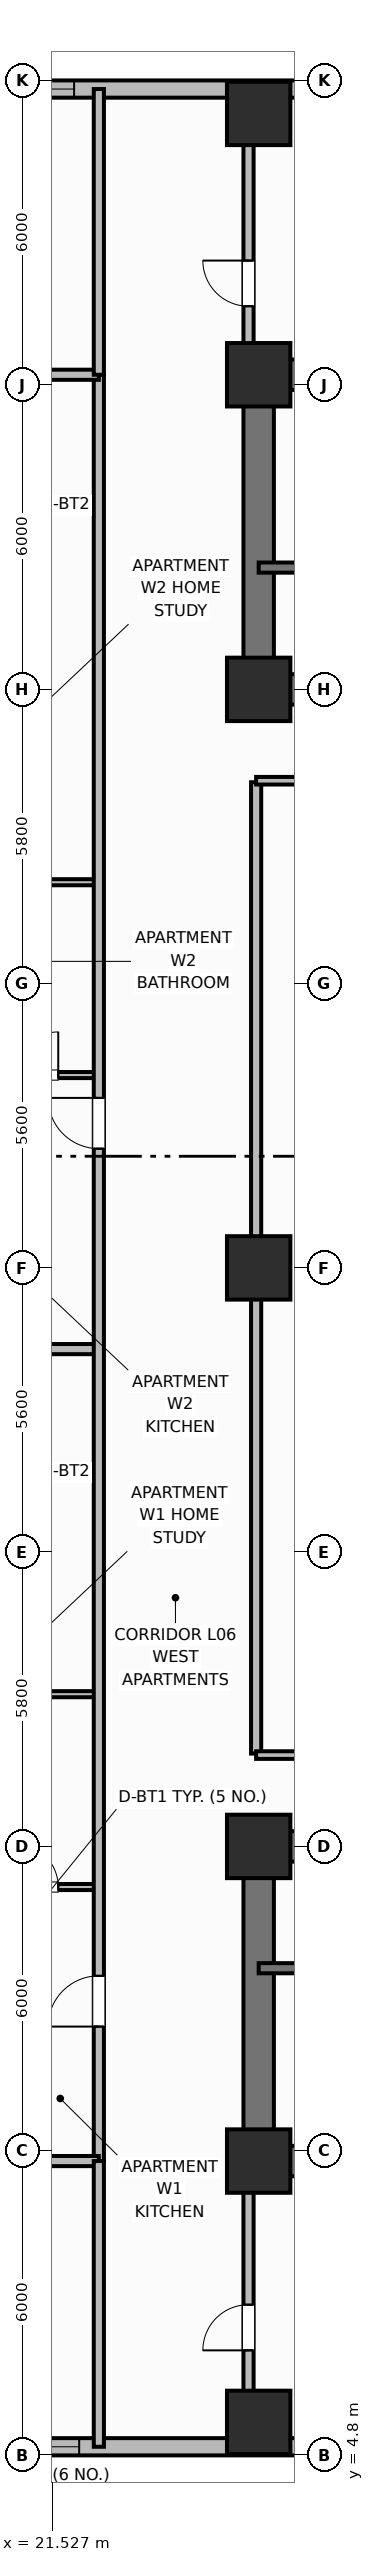
"""IFC4 building model, lengths in metres.
Left out: names, types, materials, properties, quantities, classifications, styles, units other than length and angle.
Written with IfcOpenShell. Run it as: python <this file> out.ifc"""

import sys

from ifc_helpers import new_model, si_unit, direction, frame, frame_2d, origin, origin_2d, place, context, subcontext, project, spatial, rectangle, extrude, element, fill, save


model = new_model("IFC4")
c1 = context("Model", 3, precision=1e-05, world=origin(), true_north=direction((0.0, 1.0)))
c2 = subcontext(c1, "Body", "Model", "MODEL_VIEW")
j1 = project(units=[si_unit("LENGTHUNIT", "METRE"), si_unit("PLANEANGLEUNIT", "RADIAN")], contexts=[c1])
p1 = place(None, origin())
s1 = spatial("IfcSite", under=j1, at=p1, CompositionType="ELEMENT")
p2 = place(p1, origin())
s2 = spatial("IfcBuilding", under=s1, at=p2, CompositionType="ELEMENT")
p3 = place(p2, frame((0.0, 0.0, 28.8)))
s3 = spatial("IfcBuildingStorey", under=s2, at=p3, CompositionType="ELEMENT", Elevation=28.8)
p4 = place(p3, frame((52.8, 10.6, 0.0), z_axis=(0.0, 0.0, 1.0), x_axis=(-1.0, 0.0, 0.0)))
e1 = element("IfcWall", 1, at=p4, inside=s3, PredefinedType="SHEAR", context=c2, shape_type="SweptSolid", body=[
    extrude(rectangle(XDim=27.2, YDim=0.6, at=frame_2d((13.6, 0.0))), origin(), (0.0, 0.0, 1.0), 3.7),
])
p5 = place(p3, frame((25.6, 10.9, 0.0), z_axis=(0.0, 0.0, 1.0), x_axis=(0.0, 1.0, 0.0)))
e2 = element("IfcWall", 2, at=p5, inside=s3, PredefinedType="SHEAR", context=c2, shape_type="SweptSolid", body=[
    extrude(rectangle(XDim=5.6, YDim=0.6, at=frame_2d((2.8, 0.0))), origin(), (0.0, 0.0, 1.0), 3.7),
])
p6 = place(p3, frame((25.6, 16.8, 0.0), z_axis=(0.0, 0.0, 1.0), x_axis=(1.0, 0.0, 0.0)))
e3 = element("IfcWall", 3, at=p6, inside=s3, PredefinedType="SHEAR", context=c2, shape_type="SweptSolid", body=[
    extrude(rectangle(XDim=27.2, YDim=0.6, at=frame_2d((13.6, 0.0))), origin(), (0.0, 0.0, 1.0), 3.7),
])
p7 = place(p6, frame((1.9, 0.0, 0.0)))
e4 = element("IfcOpeningElement", 4, at=p7, cuts=e3, PredefinedType="OPENING", context=c2, shape_type="SweptSolid", body=[
    extrude(rectangle(XDim=1.1, YDim=2.15, at=frame_2d((0.55, 1.075))), frame((0.0, 0.31, 0.0), z_axis=(0.0, -1.0, 0.0), x_axis=(1.0, 0.0, 0.0)), (0.0, 0.0, 1.0), 0.62),
])
p8 = place(p6, frame((13.0, 0.0, 0.0)))
e5 = element("IfcOpeningElement", 5, at=p8, cuts=e3, PredefinedType="OPENING", context=c2, shape_type="SweptSolid", body=[
    extrude(rectangle(XDim=1.2, YDim=2.15, at=frame_2d((0.6, 1.075))), frame((0.0, 0.31, 0.0), z_axis=(0.0, -1.0, 0.0), x_axis=(1.0, 0.0, 0.0)), (0.0, 0.0, 1.0), 0.62),
])
p9 = place(p6, frame((20.4, 0.0, 0.0)))
e6 = element("IfcOpeningElement", 6, at=p9, cuts=e3, PredefinedType="OPENING", context=c2, shape_type="SweptSolid", body=[
    extrude(rectangle(XDim=1.3, YDim=2.2, at=frame_2d((0.65, 1.1))), frame((0.0, 0.31, 0.0), z_axis=(0.0, -1.0, 0.0), x_axis=(1.0, 0.0, 0.0)), (0.0, 0.0, 1.0), 0.62),
])
p10 = place(p6, frame((24.65, 0.0, 0.0)))
e7 = element("IfcOpeningElement", 7, at=p10, cuts=e3, PredefinedType="OPENING", context=c2, shape_type="SweptSolid", body=[
    extrude(rectangle(XDim=0.85, YDim=2.1, at=frame_2d((0.425, 1.05))), frame((0.0, 0.31, 0.0), z_axis=(0.0, -1.0, 0.0), x_axis=(1.0, 0.0, 0.0)), (0.0, 0.0, 1.0), 0.62),
])
p11 = place(p3, frame((25.6, 45.8, 0.0), z_axis=(0.0, 0.0, 1.0), x_axis=(1.0, 0.0, 0.0)))
e8 = element("IfcWall", 8, at=p11, inside=s3, PredefinedType="SHEAR", context=c2, shape_type="SweptSolid", body=[
    extrude(rectangle(XDim=27.2, YDim=0.6, at=frame_2d((13.6, 0.0))), origin(), (0.0, 0.0, 1.0), 3.7),
])
p12 = place(p3, frame((25.6, 39.9, 0.0), z_axis=(0.0, 0.0, 1.0), x_axis=(0.0, 1.0, 0.0)))
e9 = element("IfcWall", 9, at=p12, inside=s3, PredefinedType="SHEAR", context=c2, shape_type="SweptSolid", body=[
    extrude(rectangle(XDim=5.6, YDim=0.6, at=frame_2d((2.8, 0.0))), origin(), (0.0, 0.0, 1.0), 3.7),
])
p13 = place(p3, frame((52.8, 39.6, 0.0), z_axis=(0.0, 0.0, 1.0), x_axis=(-1.0, 0.0, 0.0)))
e10 = element("IfcWall", 10, at=p13, inside=s3, PredefinedType="SHEAR", context=c2, shape_type="SweptSolid", body=[
    extrude(rectangle(XDim=27.2, YDim=0.6, at=frame_2d((13.6, 0.0))), origin(), (0.0, 0.0, 1.0), 3.7),
])
p14 = place(p13, frame((24.2, 0.0, 0.0)))
e11 = element("IfcOpeningElement", 11, at=p14, cuts=e10, PredefinedType="OPENING", context=c2, shape_type="SweptSolid", body=[
    extrude(rectangle(XDim=1.1, YDim=2.15, at=frame_2d((0.55, 1.075))), frame((0.0, 0.31, 0.0), z_axis=(0.0, -1.0, 0.0), x_axis=(1.0, 0.0, 0.0)), (0.0, 0.0, 1.0), 0.62),
])
p15 = place(p13, frame((15.1, 0.0, 0.0)))
e12 = element("IfcOpeningElement", 12, at=p15, cuts=e10, PredefinedType="OPENING", context=c2, shape_type="SweptSolid", body=[
    extrude(rectangle(XDim=1.2, YDim=2.15, at=frame_2d((0.6, 1.075))), frame((0.0, 0.31, 0.0), z_axis=(0.0, -1.0, 0.0), x_axis=(1.0, 0.0, 0.0)), (0.0, 0.0, 1.0), 0.62),
])
p16 = place(p13, frame((11.6, 0.0, 0.0)))
e13 = element("IfcOpeningElement", 13, at=p16, cuts=e10, PredefinedType="OPENING", context=c2, shape_type="SweptSolid", body=[
    extrude(rectangle(XDim=0.9, YDim=2.1, at=frame_2d((0.45, 1.05))), frame((0.0, 0.31, 0.0), z_axis=(0.0, -1.0, 0.0), x_axis=(1.0, 0.0, 0.0)), (0.0, 0.0, 1.0), 0.62),
])
p17 = place(p13, frame((3.6, 0.0, 0.0)))
e14 = element("IfcOpeningElement", 14, at=p17, cuts=e10, PredefinedType="OPENING", context=c2, shape_type="SweptSolid", body=[
    extrude(rectangle(XDim=1.0, YDim=2.15, at=frame_2d((0.5, 1.075))), frame((0.0, 0.31, 0.0), z_axis=(0.0, -1.0, 0.0), x_axis=(1.0, 0.0, 0.0)), (0.0, 0.0, 1.0), 0.62),
])
for number, where, z_axis, x_axis in (
    (15, (25.6, 10.6, 0.0), (0.0, 0.0, 1.0), (1.0, 0.0, 0.0)),
    (16, (25.6, 16.8, 0.0), (0.0, 0.0, 1.0), (1.0, 0.0, 0.0)),
    (17, (25.6, 39.6, 0.0), (0.0, 0.0, 1.0), (1.0, 0.0, 0.0)),
    (18, (25.6, 45.8, 0.0), (0.0, 0.0, 1.0), (1.0, 0.0, 0.0)),
    (19, (25.6, 28.2, 0.0), (0.0, 0.0, 1.0), (1.0, 0.0, 0.0)),
    (20, (25.6, 5.45, 0.0), (0.0, 0.0, 1.0), (1.0, 0.0, 0.0)),
    (21, (25.6, 50.95, 0.0), (0.0, 0.0, 1.0), (1.0, 0.0, 0.0)),
):
    element("IfcColumn", number, at=place(p3, frame(where, z_axis=z_axis, x_axis=x_axis)), inside=s3, PredefinedType="COLUMN", context=c2, shape_type="SweptSolid", body=[
        extrude(rectangle(XDim=1.25, YDim=1.25, at=origin_2d()), origin(), (0.0, 0.0, 1.0), 3.7),
    ])
p18 = place(p3, frame((18.6, 4.97, 0.0), z_axis=(0.0, 0.0, 1.0), x_axis=(1.0, 0.0, 0.0)))
e22 = element("IfcWall", 22, at=p18, inside=s3, PredefinedType="SOLIDWALL", context=c2, shape_type="SweptSolid", body=[
    extrude(rectangle(XDim=17.4, YDim=0.34, at=frame_2d((8.7, 0.0))), origin(), (0.0, 0.0, 1.0), 2.7),
])
p19 = place(p18, frame((1.863, 0.0, 0.68)))
e23 = element("IfcOpeningElement", 23, at=p19, cuts=e22, PredefinedType="OPENING", context=c2, shape_type="SweptSolid", body=[
    extrude(rectangle(XDim=1.6, YDim=1.9, at=frame_2d((0.8, 0.95))), frame((0.0, 0.18, 0.0), z_axis=(0.0, -1.0, 0.0), x_axis=(1.0, 0.0, 0.0)), (0.0, 0.0, 1.0), 0.36),
])
p20 = place(p18, frame((9.913, 0.0, 0.68)))
e24 = element("IfcOpeningElement", 24, at=p20, cuts=e22, PredefinedType="OPENING", context=c2, shape_type="SweptSolid", body=[
    extrude(rectangle(XDim=1.6, YDim=1.9, at=frame_2d((0.8, 0.95))), frame((0.0, 0.18, 0.0), z_axis=(0.0, -1.0, 0.0), x_axis=(1.0, 0.0, 0.0)), (0.0, 0.0, 1.0), 0.36),
])
p21 = place(p18, frame((13.587, 0.0, 0.68)))
e25 = element("IfcOpeningElement", 25, at=p21, cuts=e22, PredefinedType="OPENING", context=c2, shape_type="SweptSolid", body=[
    extrude(rectangle(XDim=1.6, YDim=1.9, at=frame_2d((0.8, 0.95))), frame((0.0, 0.18, 0.0), z_axis=(0.0, -1.0, 0.0), x_axis=(1.0, 0.0, 0.0)), (0.0, 0.0, 1.0), 0.36),
])
p22 = place(p3, frame((36.0, 51.43, 0.0), z_axis=(0.0, 0.0, 1.0), x_axis=(-1.0, 0.0, 0.0)))
e26 = element("IfcWall", 26, at=p22, inside=s3, PredefinedType="SOLIDWALL", context=c2, shape_type="SweptSolid", body=[
    extrude(rectangle(XDim=17.4, YDim=0.34, at=frame_2d((8.7, 0.0))), origin(), (0.0, 0.0, 1.0), 2.7),
])
p23 = place(p22, frame((5.637, 0.0, 0.68)))
e27 = element("IfcOpeningElement", 27, at=p23, cuts=e26, PredefinedType="OPENING", context=c2, shape_type="SweptSolid", body=[
    extrude(rectangle(XDim=2.1, YDim=1.9, at=frame_2d((1.05, 0.95))), frame((0.0, 0.18, 0.0), z_axis=(0.0, -1.0, 0.0), x_axis=(1.0, 0.0, 0.0)), (0.0, 0.0, 1.0), 0.36),
])
p24 = place(p22, frame((14.038, 0.0, 0.68)))
e28 = element("IfcOpeningElement", 28, at=p24, cuts=e26, PredefinedType="OPENING", context=c2, shape_type="SweptSolid", body=[
    extrude(rectangle(XDim=2.1, YDim=1.9, at=frame_2d((1.05, 0.95))), frame((0.0, 0.18, 0.0), z_axis=(0.0, -1.0, 0.0), x_axis=(1.0, 0.0, 0.0)), (0.0, 0.0, 1.0), 0.36),
])
p25 = place(p3, frame((25.6, 14.4, 0.0), z_axis=(0.0, 0.0, 1.0), x_axis=(1.0, 0.0, 0.0)))
e29 = element("IfcWall", 29, at=p25, inside=s3, PredefinedType="SHEAR", context=c2, shape_type="SweptSolid", body=[
    extrude(rectangle(XDim=9.55, YDim=0.2, at=frame_2d((4.775, 0.0))), origin(), (0.0, 0.0, 1.0), 3.7),
])
p26 = place(p25, frame((1.05, 0.0, 0.0)))
e30 = element("IfcOpeningElement", 30, at=p26, cuts=e29, PredefinedType="OPENING", context=c2, shape_type="SweptSolid", body=[
    extrude(rectangle(XDim=1.1, YDim=2.15, at=frame_2d((0.55, 1.075))), frame((0.0, 0.11, 0.0), z_axis=(0.0, -1.0, 0.0), x_axis=(1.0, 0.0, 0.0)), (0.0, 0.0, 1.0), 0.22),
])
p27 = place(p3, frame((35.15, 42.0, 0.0), z_axis=(0.0, 0.0, 1.0), x_axis=(-1.0, 0.0, 0.0)))
e31 = element("IfcWall", 31, at=p27, inside=s3, PredefinedType="SHEAR", context=c2, shape_type="SweptSolid", body=[
    extrude(rectangle(XDim=9.55, YDim=0.2, at=frame_2d((4.775, 0.0))), origin(), (0.0, 0.0, 1.0), 3.7),
])
p28 = place(p27, frame((7.25, 0.0, 0.0)))
e32 = element("IfcOpeningElement", 32, at=p28, cuts=e31, PredefinedType="OPENING", context=c2, shape_type="SweptSolid", body=[
    extrude(rectangle(XDim=1.1, YDim=2.15, at=frame_2d((0.55, 1.075))), frame((0.0, 0.11, 0.0), z_axis=(0.0, -1.0, 0.0), x_axis=(1.0, 0.0, 0.0)), (0.0, 0.0, 1.0), 0.22),
])
p29 = place(p3, frame((25.55, 18.63, 0.0), z_axis=(0.0, 0.0, 1.0), x_axis=(0.0, 1.0, 0.0)))
e33 = element("IfcWall", 33, at=p29, inside=s3, PredefinedType="PARTITIONING", context=c2, shape_type="SweptSolid", body=[
    extrude(rectangle(XDim=19.14, YDim=0.2, at=frame_2d((9.57, 0.0))), origin(), (0.0, 0.0, 1.0), 2.53),
])
for number, where, z_axis, x_axis in (
    (34, (25.55, 18.6, 0.0), (0.0, 0.0, 1.0), (1.0, 0.0, 0.0)),
    (35, (25.55, 37.8, 0.0), (0.0, 0.0, 1.0), (1.0, 0.0, 0.0)),
):
    element("IfcWall", number, at=place(p3, frame(where, z_axis=z_axis, x_axis=x_axis)), inside=s3, PredefinedType="PARTITIONING", context=c2, shape_type="SweptSolid", body=[
        extrude(rectangle(XDim=12.5, YDim=0.15, at=frame_2d((6.25, 0.0))), origin(), (0.0, 0.0, 1.0), 2.53),
    ])
p30 = place(p3, frame((20.2, 16.0, 0.0), z_axis=(0.0, 0.0, 1.0), x_axis=(1.0, 0.0, 0.0)))
e36 = element("IfcWall", 36, at=p30, inside=s3, PredefinedType="PARTITIONING", context=c2, shape_type="SweptSolid", body=[
    extrude(rectangle(XDim=2.25, YDim=0.12, at=frame_2d((1.125, 0.0))), origin(), (0.0, 0.0, 1.0), 2.53),
])
p31 = place(p30, frame((0.6, 0.0, 0.0)))
e37 = element("IfcOpeningElement", 37, at=p31, cuts=e36, PredefinedType="OPENING", context=c2, shape_type="SweptSolid", body=[
    extrude(rectangle(XDim=0.85, YDim=2.1, at=frame_2d((0.425, 1.05))), frame((0.0, 0.07, 0.0), z_axis=(0.0, -1.0, 0.0), x_axis=(1.0, 0.0, 0.0)), (0.0, 0.0, 1.0), 0.14),
])
p32 = place(p3, frame((20.2, 19.8, 0.0), z_axis=(0.0, 0.0, 1.0), x_axis=(1.0, 0.0, 0.0)))
e38 = element("IfcWall", 38, at=p32, inside=s3, PredefinedType="PARTITIONING", context=c2, shape_type="SweptSolid", body=[
    extrude(rectangle(XDim=2.25, YDim=0.12, at=frame_2d((1.125, 0.0))), origin(), (0.0, 0.0, 1.0), 2.53),
])
p33 = place(p3, frame((14.884, 26.6, 0.0), z_axis=(0.0, 0.0, 1.0), x_axis=(1.0, 0.0, 0.0)))
e39 = element("IfcWall", 39, at=p33, inside=s3, PredefinedType="PARTITIONING", context=c2, shape_type="SweptSolid", body=[
    extrude(rectangle(XDim=7.566, YDim=0.2, at=frame_2d((3.783, 0.0))), origin(), (0.0, 0.0, 1.0), 2.53),
])
p34 = place(p3, frame((20.2, 32.0, 0.0), z_axis=(0.0, 0.0, 1.0), x_axis=(1.0, 0.0, 0.0)))
e40 = element("IfcWall", 40, at=p34, inside=s3, PredefinedType="PARTITIONING", context=c2, shape_type="SweptSolid", body=[
    extrude(rectangle(XDim=2.25, YDim=0.12, at=frame_2d((1.125, 0.0))), origin(), (0.0, 0.0, 1.0), 2.53),
])
p35 = place(p34, frame((0.6, 0.0, 0.0)))
e41 = element("IfcOpeningElement", 41, at=p35, cuts=e40, PredefinedType="OPENING", context=c2, shape_type="SweptSolid", body=[
    extrude(rectangle(XDim=0.85, YDim=2.1, at=frame_2d((0.425, 1.05))), frame((0.0, 0.07, 0.0), z_axis=(0.0, -1.0, 0.0), x_axis=(1.0, 0.0, 0.0)), (0.0, 0.0, 1.0), 0.14),
])
p36 = place(p3, frame((20.2, 35.8, 0.0), z_axis=(0.0, 0.0, 1.0), x_axis=(1.0, 0.0, 0.0)))
e42 = element("IfcWall", 42, at=p36, inside=s3, PredefinedType="PARTITIONING", context=c2, shape_type="SweptSolid", body=[
    extrude(rectangle(XDim=2.25, YDim=0.12, at=frame_2d((1.125, 0.0))), origin(), (0.0, 0.0, 1.0), 2.53),
])
p37 = place(p3, frame((22.45, 10.6, 0.0), z_axis=(0.0, 0.0, 1.0), x_axis=(0.0, 1.0, 0.0)))
e43 = element("IfcWall", 43, at=p37, inside=s3, PredefinedType="PARTITIONING", context=c2, shape_type="SweptSolid", body=[
    extrude(rectangle(XDim=35.2, YDim=0.2, at=frame_2d((17.6, 0.0))), origin(), (0.0, 0.0, 1.0), 2.53),
])
p38 = place(p37, frame((2.65, 0.0, 0.0)))
e44 = element("IfcOpeningElement", 44, at=p38, cuts=e43, PredefinedType="OPENING", context=c2, shape_type="SweptSolid", body=[
    extrude(rectangle(XDim=1.0, YDim=2.15, at=frame_2d((0.5, 1.075))), frame((0.0, 0.11, 0.0), z_axis=(0.0, -1.0, 0.0), x_axis=(1.0, 0.0, 0.0)), (0.0, 0.0, 1.0), 0.22),
])
p39 = place(p37, frame((19.95, 0.0, 0.0)))
e45 = element("IfcOpeningElement", 45, at=p39, cuts=e43, PredefinedType="OPENING", context=c2, shape_type="SweptSolid", body=[
    extrude(rectangle(XDim=1.0, YDim=2.15, at=frame_2d((0.5, 1.075))), frame((0.0, 0.11, 0.0), z_axis=(0.0, -1.0, 0.0), x_axis=(1.0, 0.0, 0.0)), (0.0, 0.0, 1.0), 0.22),
])
for number, where, z_axis, x_axis in (
    (46, (14.99, 10.6, 0.0), (0.0, 0.0, 1.0), (1.0, 0.0, 0.0)),
    (47, (14.99, 45.8, 0.0), (0.0, 0.0, 1.0), (1.0, 0.0, 0.0)),
):
    element("IfcWall", number, at=place(p3, frame(where, z_axis=z_axis, x_axis=x_axis)), inside=s3, PredefinedType="PARTITIONING", context=c2, shape_type="SweptSolid", body=[
        extrude(rectangle(XDim=7.46, YDim=0.2, at=frame_2d((3.73, 0.0))), origin(), (0.0, 0.0, 1.0), 2.53),
    ])
p40 = place(p3, frame((22.45, 4.97, 0.0), z_axis=(0.0, 0.0, 1.0), x_axis=(0.0, 1.0, 0.0)))
e48 = element("IfcWall", 48, at=p40, inside=s3, PredefinedType="PARTITIONING", context=c2, shape_type="SweptSolid", body=[
    extrude(rectangle(XDim=5.63, YDim=0.2, at=frame_2d((2.815, 0.0))), origin(), (0.0, 0.0, 1.0), 2.53),
])
p41 = place(p3, frame((22.45, 45.8, 0.0), z_axis=(0.0, 0.0, 1.0), x_axis=(0.0, 1.0, 0.0)))
e49 = element("IfcWall", 49, at=p41, inside=s3, PredefinedType="PARTITIONING", context=c2, shape_type="SweptSolid", body=[
    extrude(rectangle(XDim=5.63, YDim=0.2, at=frame_2d((2.815, 0.0))), origin(), (0.0, 0.0, 1.0), 2.53),
])
p42 = place(p3, frame((25.4, 5.57, 0.0), z_axis=(0.0, 0.0, 1.0), x_axis=(0.0, 1.0, 0.0)))
e50 = element("IfcWall", 50, at=p42, inside=s3, PredefinedType="PARTITIONING", context=c2, shape_type="SweptSolid", body=[
    extrude(rectangle(XDim=4.73, YDim=0.2, at=frame_2d((2.365, 0.0))), origin(), (0.0, 0.0, 1.0), 2.53),
])
p43 = place(p42, frame((1.3, 0.0, 0.0)))
e51 = element("IfcOpeningElement", 51, at=p43, cuts=e50, PredefinedType="OPENING", context=c2, shape_type="SweptSolid", body=[
    extrude(rectangle(XDim=0.9, YDim=2.1, at=frame_2d((0.45, 1.05))), frame((0.0, 0.11, 0.0), z_axis=(0.0, -1.0, 0.0), x_axis=(1.0, 0.0, 0.0)), (0.0, 0.0, 1.0), 0.22),
])
p44 = place(p3, frame((25.4, 46.1, 0.0), z_axis=(0.0, 0.0, 1.0), x_axis=(0.0, 1.0, 0.0)))
e52 = element("IfcWall", 52, at=p44, inside=s3, PredefinedType="PARTITIONING", context=c2, shape_type="SweptSolid", body=[
    extrude(rectangle(XDim=4.73, YDim=0.2, at=frame_2d((2.365, 0.0))), origin(), (0.0, 0.0, 1.0), 2.53),
])
p45 = place(p44, frame((1.05, 0.0, 0.0)))
e53 = element("IfcOpeningElement", 53, at=p45, cuts=e52, PredefinedType="OPENING", context=c2, shape_type="SweptSolid", body=[
    extrude(rectangle(XDim=0.9, YDim=2.1, at=frame_2d((0.45, 1.05))), frame((0.0, 0.11, 0.0), z_axis=(0.0, -1.0, 0.0), x_axis=(1.0, 0.0, 0.0)), (0.0, 0.0, 1.0), 0.22),
])
p46 = place(p19, origin())
e54 = element("IfcWindow", 54, at=p46, inside=s3, PartitioningType="SINGLE_PANEL", PredefinedType="WINDOW", context=c2, shape_type="SweptSolid", body=[
    extrude(rectangle(XDim=1.6, YDim=1.9, at=frame_2d((0.8, 0.95))), frame((0.0, 0.03, 0.0), z_axis=(0.0, -1.0, 0.0), x_axis=(1.0, 0.0, 0.0)), (0.0, 0.0, 1.0), 0.06),
])
fill(e23, e54)
p47 = place(p24, origin())
e55 = element("IfcWindow", 55, at=p47, inside=s3, PartitioningType="SINGLE_PANEL", PredefinedType="WINDOW", context=c2, shape_type="SweptSolid", body=[
    extrude(rectangle(XDim=2.1, YDim=1.9, at=frame_2d((1.05, 0.95))), frame((0.0, 0.03, 0.0), z_axis=(0.0, -1.0, 0.0), x_axis=(1.0, 0.0, 0.0)), (0.0, 0.0, 1.0), 0.06),
])
fill(e28, e55)
p48 = place(p31, origin())
e56 = element("IfcDoor", 56, at=p48, inside=s3, OperationType="SINGLE_SWING_LEFT", PredefinedType="DOOR", context=c2, shape_type="SweptSolid", body=[
    extrude(rectangle(XDim=0.85, YDim=2.1, at=frame_2d((0.425, 1.05))), frame((0.0, 0.025, 0.0), z_axis=(0.0, -1.0, 0.0), x_axis=(1.0, 0.0, 0.0)), (0.0, 0.0, 1.0), 0.05),
])
fill(e37, e56)
p49 = place(p35, origin())
e57 = element("IfcDoor", 57, at=p49, inside=s3, OperationType="SINGLE_SWING_RIGHT", PredefinedType="DOOR", context=c2, shape_type="SweptSolid", body=[
    extrude(rectangle(XDim=0.85, YDim=2.1, at=frame_2d((0.425, 1.05))), frame((0.0, 0.025, 0.0), z_axis=(0.0, -1.0, 0.0), x_axis=(1.0, 0.0, 0.0)), (0.0, 0.0, 1.0), 0.05),
])
fill(e41, e57)
p50 = place(p38, origin())
e58 = element("IfcDoor", 58, at=p50, inside=s3, OperationType="SINGLE_SWING_LEFT", PredefinedType="DOOR", context=c2, shape_type="SweptSolid", body=[
    extrude(rectangle(XDim=1.0, YDim=2.15, at=frame_2d((0.5, 1.075))), frame((0.0, 0.025, 0.0), z_axis=(0.0, -1.0, 0.0), x_axis=(1.0, 0.0, 0.0)), (0.0, 0.0, 1.0), 0.05),
])
fill(e44, e58)
p51 = place(p39, origin())
e59 = element("IfcDoor", 59, at=p51, inside=s3, OperationType="SINGLE_SWING_RIGHT", PredefinedType="DOOR", context=c2, shape_type="SweptSolid", body=[
    extrude(rectangle(XDim=1.0, YDim=2.15, at=frame_2d((0.5, 1.075))), frame((0.0, 0.025, 0.0), z_axis=(0.0, -1.0, 0.0), x_axis=(1.0, 0.0, 0.0)), (0.0, 0.0, 1.0), 0.05),
])
fill(e45, e59)
p52 = place(p43, origin())
e60 = element("IfcDoor", 60, at=p52, inside=s3, OperationType="SINGLE_SWING_LEFT", PredefinedType="DOOR", context=c2, shape_type="SweptSolid", body=[
    extrude(rectangle(XDim=0.9, YDim=2.1, at=frame_2d((0.45, 1.05))), frame((0.0, 0.025, 0.0), z_axis=(0.0, -1.0, 0.0), x_axis=(1.0, 0.0, 0.0)), (0.0, 0.0, 1.0), 0.05),
])
fill(e51, e60)
p53 = place(p45, origin())
e61 = element("IfcDoor", 61, at=p53, inside=s3, OperationType="SINGLE_SWING_RIGHT", PredefinedType="DOOR", context=c2, shape_type="SweptSolid", body=[
    extrude(rectangle(XDim=0.9, YDim=2.1, at=frame_2d((0.45, 1.05))), frame((0.0, 0.025, 0.0), z_axis=(0.0, -1.0, 0.0), x_axis=(1.0, 0.0, 0.0)), (0.0, 0.0, 1.0), 0.05),
])
fill(e53, e61)
save(model, sys.argv[1])
